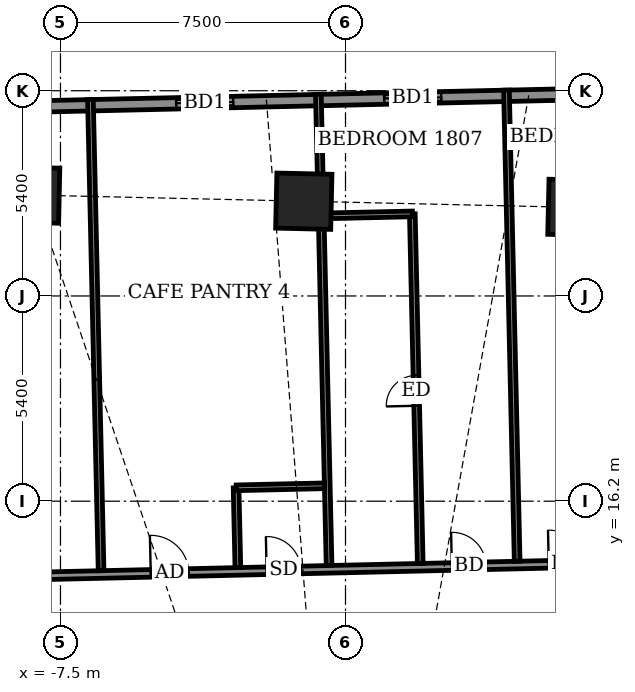
"""IFC4 building model, lengths in metres.
Left out: names, types, materials, properties, quantities, classifications, styles, units other than length and angle.
Written with IfcOpenShell. Run it as: python <this file> out.ifc"""

import sys

from ifc_helpers import new_model, si_unit, direction, frame, frame_2d, origin, origin_2d, place, context, subcontext, project, spatial, rectangle, extrude, element, fill, save


model = new_model("IFC4")
c1 = context("Model", 3, precision=1e-05, world=origin(), true_north=direction((0.0, 1.0)))
c2 = subcontext(c1, "Body", "Model", "MODEL_VIEW")
j1 = project(units=[si_unit("LENGTHUNIT", "METRE"), si_unit("PLANEANGLEUNIT", "RADIAN")], contexts=[c1])
p1 = place(None, origin())
s1 = spatial("IfcSite", under=j1, at=p1, CompositionType="ELEMENT")
p2 = place(p1, origin())
s2 = spatial("IfcBuilding", under=s1, at=p2, CompositionType="ELEMENT")
p3 = place(p2, frame((0.0, 0.0, 74.7)))
s3 = spatial("IfcBuildingStorey", under=s2, at=p3, CompositionType="ELEMENT", Elevation=74.7)
for number, where, z_axis, x_axis in (
    (1, (6.062, 23.93, -0.55), (0.0, 0.0, 1.0), (-1.0, 0.023, 0.0)),
    (2, (-1.097, 24.093, -0.55), (0.0, 0.0, 1.0), (-1.0, 0.023, 0.0)),
    (3, (-8.259, 24.255, -0.55), (0.0, 0.0, 1.0), (-1.0, 0.023, 0.0)),
):
    element("IfcColumn", number, at=place(p3, frame(where, z_axis=z_axis, x_axis=x_axis)), inside=s3, PredefinedType="COLUMN", context=c2, shape_type="SweptSolid", body=[
        extrude(rectangle(XDim=1.45, YDim=1.45, at=origin_2d()), origin(), (0.0, 0.0, 1.0), 4.6),
    ])
p4 = place(p3, frame((24.809, 27.333, 0.0), z_axis=(0.0, 0.0, 1.0), x_axis=(-0.999742489858, -0.022692597327, 0.0)))
e4 = element("IfcWall", 4, at=p4, inside=s3, PredefinedType="SOLIDWALL", context=c2, shape_type="SweptSolid", body=[
    extrude(rectangle(XDim=46.972, YDim=0.3, at=frame_2d((23.486, 0.0))), origin(), (0.0, 0.0, 1.0), 2.45),
])
p5 = place(p4, frame((2.036, 0.0, 0.0)))
e5 = element("IfcOpeningElement", 5, at=p5, cuts=e4, PredefinedType="OPENING", context=c2, shape_type="SweptSolid", body=[
    extrude(rectangle(XDim=1.5, YDim=2.4, at=frame_2d((0.75, 1.2))), frame((0.0, 0.16, 0.0), z_axis=(0.0, -1.0, 0.0), x_axis=(1.0, 0.0, 0.0)), (0.0, 0.0, 1.0), 0.32),
])
p6 = place(p4, frame((7.447, 0.0, 0.0)))
e6 = element("IfcOpeningElement", 6, at=p6, cuts=e4, PredefinedType="OPENING", context=c2, shape_type="SweptSolid", body=[
    extrude(rectangle(XDim=1.5, YDim=2.4, at=frame_2d((0.75, 1.2))), frame((0.0, 0.16, 0.0), z_axis=(0.0, -1.0, 0.0), x_axis=(1.0, 0.0, 0.0)), (0.0, 0.0, 1.0), 0.32),
])
p7 = place(p4, frame((12.397, 0.0, 0.0)))
e7 = element("IfcOpeningElement", 7, at=p7, cuts=e4, PredefinedType="OPENING", context=c2, shape_type="SweptSolid", body=[
    extrude(rectangle(XDim=1.5, YDim=2.4, at=frame_2d((0.75, 1.2))), frame((0.0, 0.16, 0.0), z_axis=(0.0, -1.0, 0.0), x_axis=(1.0, 0.0, 0.0)), (0.0, 0.0, 1.0), 0.32),
])
p8 = place(p4, frame((17.347, 0.0, 0.0)))
e8 = element("IfcOpeningElement", 8, at=p8, cuts=e4, PredefinedType="OPENING", context=c2, shape_type="SweptSolid", body=[
    extrude(rectangle(XDim=1.5, YDim=2.4, at=frame_2d((0.75, 1.2))), frame((0.0, 0.16, 0.0), z_axis=(0.0, -1.0, 0.0), x_axis=(1.0, 0.0, 0.0)), (0.0, 0.0, 1.0), 0.32),
])
p9 = place(p4, frame((22.297, 0.0, 0.0)))
e9 = element("IfcOpeningElement", 9, at=p9, cuts=e4, PredefinedType="OPENING", context=c2, shape_type="SweptSolid", body=[
    extrude(rectangle(XDim=1.5, YDim=2.4, at=frame_2d((0.75, 1.2))), frame((0.0, 0.16, 0.0), z_axis=(0.0, -1.0, 0.0), x_axis=(1.0, 0.0, 0.0)), (0.0, 0.0, 1.0), 0.32),
])
p10 = place(p4, frame((27.772, 0.0, 0.0)))
e10 = element("IfcOpeningElement", 10, at=p10, cuts=e4, PredefinedType="OPENING", context=c2, shape_type="SweptSolid", body=[
    extrude(rectangle(XDim=1.5, YDim=2.4, at=frame_2d((0.75, 1.2))), frame((0.0, 0.16, 0.0), z_axis=(0.0, -1.0, 0.0), x_axis=(1.0, 0.0, 0.0)), (0.0, 0.0, 1.0), 0.32),
])
p11 = place(p4, frame((33.997, 0.0, 0.9)))
e11 = element("IfcOpeningElement", 11, at=p11, cuts=e4, PredefinedType="OPENING", context=c2, shape_type="SweptSolid", body=[
    extrude(rectangle(XDim=2.4, YDim=1.5, at=frame_2d((1.2, 0.75))), frame((0.0, 0.16, 0.0), z_axis=(0.0, -1.0, 0.0), x_axis=(1.0, 0.0, 0.0)), (0.0, 0.0, 1.0), 0.32),
])
p12 = place(p4, frame((41.797, 0.0, 0.9)))
e12 = element("IfcOpeningElement", 12, at=p12, cuts=e4, PredefinedType="OPENING", context=c2, shape_type="SweptSolid", body=[
    extrude(rectangle(XDim=2.4, YDim=1.5, at=frame_2d((1.2, 0.75))), frame((0.0, 0.16, 0.0), z_axis=(0.0, -1.0, 0.0), x_axis=(1.0, 0.0, 0.0)), (0.0, 0.0, 1.0), 0.32),
])
p13 = place(p3, frame((-25.525, 13.838, 0.0), z_axis=(0.0, 0.0, 1.0), x_axis=(0.999742549888, 0.022689952476, 0.0)))
e13 = element("IfcWall", 13, at=p13, inside=s3, PredefinedType="PARTITIONING", context=c2, shape_type="SweptSolid", body=[
    extrude(rectangle(XDim=53.778, YDim=0.2, at=frame_2d((26.889, 0.0))), origin(), (0.0, 0.0, 1.0), 2.25),
])
p14 = place(p13, frame((49.114, 0.0, 0.0)))
e14 = element("IfcOpeningElement", 14, at=p14, cuts=e13, PredefinedType="OPENING", context=c2, shape_type="SweptSolid", body=[
    extrude(rectangle(XDim=1.0, YDim=2.1, at=frame_2d((0.5, 1.05))), frame((0.0, 0.11, 0.0), z_axis=(0.0, -1.0, 0.0), x_axis=(1.0, 0.0, 0.0)), (0.0, 0.0, 1.0), 0.22),
])
p15 = place(p13, frame((40.781, 0.0, 0.0)))
e15 = element("IfcOpeningElement", 15, at=p15, cuts=e13, PredefinedType="OPENING", context=c2, shape_type="SweptSolid", body=[
    extrude(rectangle(XDim=0.9, YDim=2.1, at=frame_2d((0.45, 1.05))), frame((0.0, 0.11, 0.0), z_axis=(0.0, -1.0, 0.0), x_axis=(1.0, 0.0, 0.0)), (0.0, 0.0, 1.0), 0.22),
])
p16 = place(p13, frame((38.231, 0.0, 0.0)))
e16 = element("IfcOpeningElement", 16, at=p16, cuts=e13, PredefinedType="OPENING", context=c2, shape_type="SweptSolid", body=[
    extrude(rectangle(XDim=0.9, YDim=2.1, at=frame_2d((0.45, 1.05))), frame((0.0, 0.11, 0.0), z_axis=(0.0, -1.0, 0.0), x_axis=(1.0, 0.0, 0.0)), (0.0, 0.0, 1.0), 0.22),
])
p17 = place(p13, frame((30.881, 0.0, 0.0)))
e17 = element("IfcOpeningElement", 17, at=p17, cuts=e13, PredefinedType="OPENING", context=c2, shape_type="SweptSolid", body=[
    extrude(rectangle(XDim=0.9, YDim=2.1, at=frame_2d((0.45, 1.05))), frame((0.0, 0.11, 0.0), z_axis=(0.0, -1.0, 0.0), x_axis=(1.0, 0.0, 0.0)), (0.0, 0.0, 1.0), 0.22),
])
p18 = place(p13, frame((28.331, 0.0, 0.0)))
e18 = element("IfcOpeningElement", 18, at=p18, cuts=e13, PredefinedType="OPENING", context=c2, shape_type="SweptSolid", body=[
    extrude(rectangle(XDim=0.9, YDim=2.1, at=frame_2d((0.45, 1.05))), frame((0.0, 0.11, 0.0), z_axis=(0.0, -1.0, 0.0), x_axis=(1.0, 0.0, 0.0)), (0.0, 0.0, 1.0), 0.22),
])
p19 = place(p13, frame((20.406, 0.0, 0.0)))
e19 = element("IfcOpeningElement", 19, at=p19, cuts=e13, PredefinedType="OPENING", context=c2, shape_type="SweptSolid", body=[
    extrude(rectangle(XDim=1.0, YDim=2.1, at=frame_2d((0.5, 1.05))), frame((0.0, 0.11, 0.0), z_axis=(0.0, -1.0, 0.0), x_axis=(1.0, 0.0, 0.0)), (0.0, 0.0, 1.0), 0.22),
])
p20 = place(p13, frame((23.456, 0.0, 0.0)))
e20 = element("IfcOpeningElement", 20, at=p20, cuts=e13, PredefinedType="OPENING", context=c2, shape_type="SweptSolid", body=[
    extrude(rectangle(XDim=0.9, YDim=2.1, at=frame_2d((0.45, 1.05))), frame((0.0, 0.11, 0.0), z_axis=(0.0, -1.0, 0.0), x_axis=(1.0, 0.0, 0.0)), (0.0, 0.0, 1.0), 0.22),
])
p21 = place(p13, frame((14.931, 0.0, 0.0)))
e21 = element("IfcOpeningElement", 21, at=p21, cuts=e13, PredefinedType="OPENING", context=c2, shape_type="SweptSolid", body=[
    extrude(rectangle(XDim=1.0, YDim=2.1, at=frame_2d((0.5, 1.05))), frame((0.0, 0.11, 0.0), z_axis=(0.0, -1.0, 0.0), x_axis=(1.0, 0.0, 0.0)), (0.0, 0.0, 1.0), 0.22),
])
p22 = place(p13, frame((3.331, 0.0, 0.0)))
e22 = element("IfcOpeningElement", 22, at=p22, cuts=e13, PredefinedType="OPENING", context=c2, shape_type="SweptSolid", body=[
    extrude(rectangle(XDim=1.0, YDim=2.1, at=frame_2d((0.5, 1.05))), frame((0.0, 0.11, 0.0), z_axis=(0.0, -1.0, 0.0), x_axis=(1.0, 0.0, 0.0)), (0.0, 0.0, 1.0), 0.22),
])
p23 = place(p13, frame((10.006, 0.0, 0.0)))
e23 = element("IfcOpeningElement", 23, at=p23, cuts=e13, PredefinedType="OPENING", context=c2, shape_type="SweptSolid", body=[
    extrude(rectangle(XDim=0.9, YDim=2.1, at=frame_2d((0.45, 1.05))), frame((0.0, 0.11, 0.0), z_axis=(0.0, -1.0, 0.0), x_axis=(1.0, 0.0, 0.0)), (0.0, 0.0, 1.0), 0.22),
])
p24 = place(p3, frame((-6.431, 14.371, 0.0), z_axis=(0.0, 0.0, 1.0), x_axis=(-0.022661475803, 0.999743195783, 0.0)))
e24 = element("IfcWall", 24, at=p24, inside=s3, PredefinedType="PARTITIONING", context=c2, shape_type="SweptSolid", body=[
    extrude(rectangle(XDim=12.4, YDim=0.15, at=frame_2d((6.2, 0.0))), origin(), (0.0, 0.0, 1.0), 2.45),
])
p25 = place(p3, frame((-2.832, 14.453, 0.0), z_axis=(0.0, 0.0, 1.0), x_axis=(-0.022325208909, 0.999750761464, 0.0)))
e25 = element("IfcWall", 25, at=p25, inside=s3, PredefinedType="PARTITIONING", context=c2, shape_type="SweptSolid", body=[
    extrude(rectangle(XDim=2.1, YDim=0.15, at=frame_2d((1.05, 0.0))), origin(), (0.0, 0.0, 1.0), 4.05),
])
p26 = place(p3, frame((-0.432, 14.507, 0.0), z_axis=(0.0, 0.0, 1.0), x_axis=(-0.022759867473, 0.999740960666, 0.0)))
e26 = element("IfcWall", 26, at=p26, inside=s3, PredefinedType="PARTITIONING", context=c2, shape_type="SweptSolid", body=[
    extrude(rectangle(XDim=12.4, YDim=0.15, at=frame_2d((6.2, 0.0))), origin(), (0.0, 0.0, 1.0), 2.85),
])
p27 = place(p3, frame((1.967, 14.562, 0.0), z_axis=(0.0, 0.0, 1.0), x_axis=(-0.022717185456, 0.999741931443, 0.0)))
e27 = element("IfcWall", 27, at=p27, inside=s3, PredefinedType="PARTITIONING", context=c2, shape_type="SweptSolid", body=[
    extrude(rectangle(XDim=9.199, YDim=0.15, at=frame_2d((4.6, 0.0))), origin(), (0.0, 0.0, 1.0), 2.45),
])
p28 = place(p27, frame((4.15, 0.0, 0.0)))
e28 = element("IfcOpeningElement", 28, at=p28, cuts=e27, PredefinedType="OPENING", context=c2, shape_type="SweptSolid", body=[
    extrude(rectangle(XDim=0.8, YDim=2.1, at=frame_2d((0.4, 1.05))), frame((0.0, 0.085, 0.0), z_axis=(0.0, -1.0, 0.0), x_axis=(1.0, 0.0, 0.0)), (0.0, 0.0, 1.0), 0.17),
])
p29 = place(p3, frame((4.517, 14.62, 0.0), z_axis=(0.0, 0.0, 1.0), x_axis=(-0.022741979748, 0.999741367733, 0.0)))
e29 = element("IfcWall", 29, at=p29, inside=s3, PredefinedType="PARTITIONING", context=c2, shape_type="SweptSolid", body=[
    extrude(rectangle(XDim=12.399, YDim=0.15, at=frame_2d((6.2, 0.0))), origin(), (0.0, 0.0, 1.0), 2.45),
])
p30 = place(p3, frame((-2.875, 16.552, 0.0), z_axis=(0.0, 0.0, 1.0), x_axis=(0.999740260747, 0.02279059109, 0.0)))
e30 = element("IfcWall", 30, at=p30, inside=s3, PredefinedType="PARTITIONING", context=c2, shape_type="SweptSolid", body=[
    extrude(rectangle(XDim=2.324, YDim=0.15, at=frame_2d((1.162, 0.0))), origin(), (0.0, 0.0, 1.0), 2.85),
])
p31 = place(p3, frame((-0.562, 23.707, 0.0), z_axis=(0.0, 0.0, 1.0), x_axis=(0.999749744571, 0.022370700241, 0.0)))
e31 = element("IfcWall", 31, at=p31, inside=s3, PredefinedType="PARTITIONING", context=c2, shape_type="SweptSolid", body=[
    extrude(rectangle(XDim=2.324, YDim=0.15, at=frame_2d((1.162, 0.0))), origin(), (0.0, 0.0, 1.0), 2.45),
])
p32 = place(p9, origin())
e32 = element("IfcDoor", 32, at=p32, inside=s3, OperationType="SLIDING_TO_LEFT", PredefinedType="DOOR", context=c2, shape_type="SweptSolid", body=[
    extrude(rectangle(XDim=1.5, YDim=2.4, at=frame_2d((0.75, 1.2))), frame((0.0, 0.025, 0.0), z_axis=(0.0, -1.0, 0.0), x_axis=(1.0, 0.0, 0.0)), (0.0, 0.0, 1.0), 0.05),
])
fill(e9, e32)
p33 = place(p10, origin())
e33 = element("IfcDoor", 33, at=p33, inside=s3, OperationType="SLIDING_TO_LEFT", PredefinedType="DOOR", context=c2, shape_type="SweptSolid", body=[
    extrude(rectangle(XDim=1.5, YDim=2.4, at=frame_2d((0.75, 1.2))), frame((0.0, 0.025, 0.0), z_axis=(0.0, -1.0, 0.0), x_axis=(1.0, 0.0, 0.0)), (0.0, 0.0, 1.0), 0.05),
])
fill(e10, e33)
p34 = place(p17, origin())
e34 = element("IfcDoor", 34, at=p34, inside=s3, OperationType="SINGLE_SWING_RIGHT", PredefinedType="DOOR", context=c2, shape_type="SweptSolid", body=[
    extrude(rectangle(XDim=0.9, YDim=2.1, at=frame_2d((0.45, 1.05))), frame((0.0, 0.025, 0.0), z_axis=(0.0, -1.0, 0.0), x_axis=(1.0, 0.0, 0.0)), (0.0, 0.0, 1.0), 0.05),
])
fill(e17, e34)
p35 = place(p18, origin())
e35 = element("IfcDoor", 35, at=p35, inside=s3, OperationType="SINGLE_SWING_LEFT", PredefinedType="DOOR", context=c2, shape_type="SweptSolid", body=[
    extrude(rectangle(XDim=0.9, YDim=2.1, at=frame_2d((0.45, 1.05))), frame((0.0, 0.025, 0.0), z_axis=(0.0, -1.0, 0.0), x_axis=(1.0, 0.0, 0.0)), (0.0, 0.0, 1.0), 0.05),
])
fill(e18, e35)
p36 = place(p28, origin())
e36 = element("IfcDoor", 36, at=p36, inside=s3, OperationType="SINGLE_SWING_LEFT", PredefinedType="DOOR", context=c2, shape_type="SweptSolid", body=[
    extrude(rectangle(XDim=0.8, YDim=2.1, at=frame_2d((0.4, 1.05))), frame((0.0, 0.025, 0.0), z_axis=(0.0, -1.0, 0.0), x_axis=(1.0, 0.0, 0.0)), (0.0, 0.0, 1.0), 0.05),
])
fill(e28, e36)
p37 = place(p19, origin())
e37 = element("IfcDoor", 37, at=p37, inside=s3, OperationType="SINGLE_SWING_LEFT", PredefinedType="DOOR", context=c2, shape_type="SweptSolid", body=[
    extrude(rectangle(XDim=1.0, YDim=2.1, at=frame_2d((0.5, 1.05))), frame((0.0, 0.025, 0.0), z_axis=(0.0, -1.0, 0.0), x_axis=(1.0, 0.0, 0.0)), (0.0, 0.0, 1.0), 0.05),
])
fill(e19, e37)
p38 = place(p20, origin())
e38 = element("IfcDoor", 38, at=p38, inside=s3, OperationType="SINGLE_SWING_LEFT", PredefinedType="DOOR", context=c2, shape_type="SweptSolid", body=[
    extrude(rectangle(XDim=0.9, YDim=2.1, at=frame_2d((0.45, 1.05))), frame((0.0, 0.025, 0.0), z_axis=(0.0, -1.0, 0.0), x_axis=(1.0, 0.0, 0.0)), (0.0, 0.0, 1.0), 0.05),
])
fill(e20, e38)
save(model, sys.argv[1])
